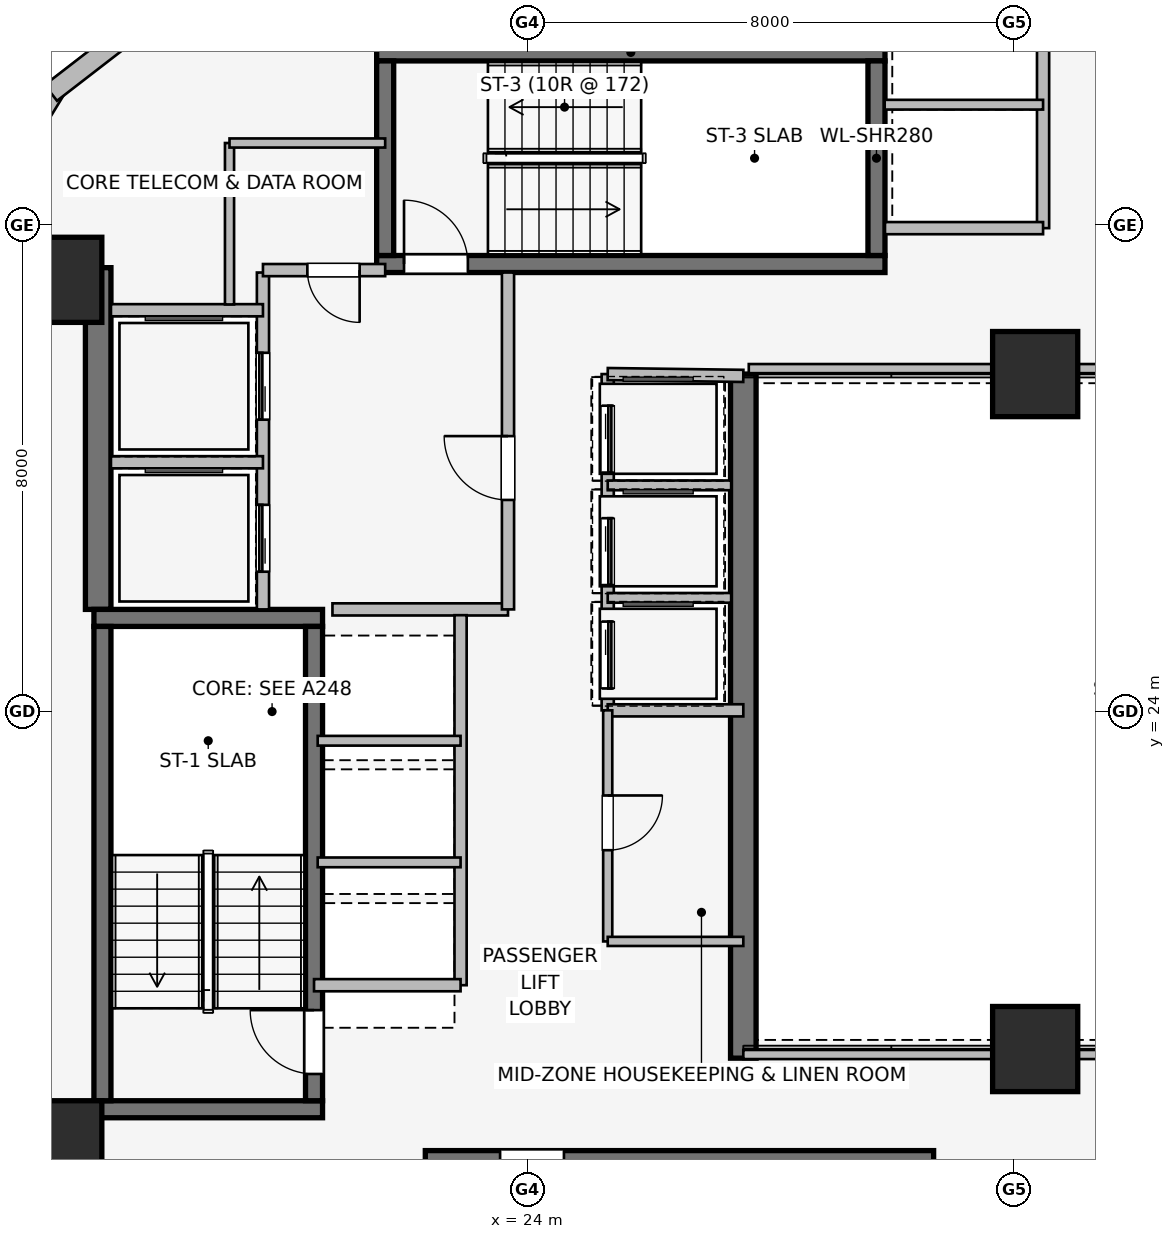
"""IFC4 building model, lengths in metres.
Left out: names, types, materials, properties, quantities, classifications, styles, units other than length and angle.
Written with IfcOpenShell. Run it as: python <this file> out.ifc"""

import sys

from ifc_helpers import new_model, si_unit, direction, frame, frame_2d, origin, origin_2d, place, context, subcontext, project, spatial, rectangle, extrude, element, fill, save


model = new_model("IFC4")
c1 = context("Model", 3, precision=1e-05, world=origin(), true_north=direction((0.0, 1.0)))
c2 = subcontext(c1, "Body", "Model", "MODEL_VIEW")
j1 = project(units=[si_unit("LENGTHUNIT", "METRE"), si_unit("PLANEANGLEUNIT", "RADIAN")], contexts=[c1])
p1 = place(None, origin())
s1 = spatial("IfcSite", under=j1, at=p1, CompositionType="ELEMENT")
p2 = place(p1, origin())
s2 = spatial("IfcBuilding", under=s1, at=p2, CompositionType="ELEMENT")
p3 = place(p2, frame((0.0, 0.0, 170.55)))
s3 = spatial("IfcBuildingStorey", under=s2, at=p3, CompositionType="ELEMENT", Elevation=170.55)
p4 = place(p3, frame((16.94, 25.68, 0.0), z_axis=(0.0, 0.0, 1.0), x_axis=(0.0, 1.0, 0.0)))
e1 = element("IfcWall", 1, at=p4, inside=s3, PredefinedType="SHEAR", context=c2, shape_type="SweptSolid", body=[
    extrude(rectangle(XDim=5.62, YDim=0.42, at=frame_2d((2.81, 0.0))), origin(), (0.0, 0.0, 1.0), 3.45),
])
p5 = place(p3, frame((27.55, 29.55, 0.0), z_axis=(0.0, 0.0, 1.0), x_axis=(0.0, -1.0, 0.0)))
e2 = element("IfcWall", 2, at=p5, inside=s3, PredefinedType="SHEAR", context=c2, shape_type="SweptSolid", body=[
    extrude(rectangle(XDim=11.25, YDim=0.42, at=frame_2d((5.625, 0.0))), origin(), (0.0, 0.0, 1.0), 3.45),
])
for number, where, z_axis, x_axis in (
    (3, (16.87, 17.46, 0.0), (0.0, 0.0, 1.0), (1.0, 0.0, 0.0)),
    (4, (20.63, 25.54, 0.0), (0.0, 0.0, 1.0), (-1.0, 0.0, 0.0)),
):
    element("IfcWall", number, at=place(p3, frame(where, z_axis=z_axis, x_axis=x_axis)), inside=s3, PredefinedType="SHEAR", context=c2, shape_type="SweptSolid", body=[
        extrude(rectangle(XDim=3.76, YDim=0.28, at=frame_2d((1.88, 0.0))), origin(), (0.0, 0.0, 1.0), 3.45),
    ])
p6 = place(p3, frame((17.01, 25.4, 0.0), z_axis=(0.0, 0.0, 1.0), x_axis=(0.0, -1.0, 0.0)))
e5 = element("IfcWall", 5, at=p6, inside=s3, PredefinedType="SHEAR", context=c2, shape_type="SweptSolid", body=[
    extrude(rectangle(XDim=7.8, YDim=0.28, at=frame_2d((3.9, 0.0))), origin(), (0.0, 0.0, 1.0), 3.45),
])
p7 = place(p3, frame((20.49, 17.6, 0.0), z_axis=(0.0, 0.0, 1.0), x_axis=(0.0, 1.0, 0.0)))
e6 = element("IfcWall", 6, at=p7, inside=s3, PredefinedType="SHEAR", context=c2, shape_type="SweptSolid", body=[
    extrude(rectangle(XDim=7.8, YDim=0.28, at=frame_2d((3.9, 0.0))), origin(), (0.0, 0.0, 1.0), 3.45),
])
p8 = place(p7, frame((0.44, 0.0, 0.0)))
e7 = element("IfcOpeningElement", 7, at=p8, cuts=e6, PredefinedType="OPENING", context=c2, shape_type="SweptSolid", body=[
    extrude(rectangle(XDim=1.05, YDim=2.0, at=frame_2d((0.525, 1.0))), frame((0.0, 0.15, 0.0), z_axis=(0.0, -1.0, 0.0), x_axis=(1.0, 0.0, 0.0)), (0.0, 0.0, 1.0), 0.3),
])
p9 = place(p3, frame((30.68, 16.64, 0.0), z_axis=(0.0, 0.0, 1.0), x_axis=(-1.0, 0.0, 0.0)))
e8 = element("IfcWall", 8, at=p9, inside=s3, PredefinedType="SHEAR", context=c2, shape_type="SweptSolid", body=[
    extrude(rectangle(XDim=8.36, YDim=0.28, at=frame_2d((4.18, 0.0))), origin(), (0.0, 0.0, 1.0), 3.45),
])
p10 = place(p9, frame((6.08, 0.0, 0.0)))
e9 = element("IfcOpeningElement", 9, at=p10, cuts=e8, PredefinedType="OPENING", context=c2, shape_type="SweptSolid", body=[
    extrude(rectangle(XDim=1.05, YDim=2.0, at=frame_2d((0.525, 1.0))), frame((0.0, 0.15, 0.0), z_axis=(0.0, -1.0, 0.0), x_axis=(1.0, 0.0, 0.0)), (0.0, 0.0, 1.0), 0.3),
])
p11 = place(p3, frame((21.52, 31.36, 0.0), z_axis=(0.0, 0.0, 1.0), x_axis=(1.0, 0.0, 0.0)))
e10 = element("IfcWall", 10, at=p11, inside=s3, PredefinedType="SHEAR", context=c2, shape_type="SweptSolid", body=[
    extrude(rectangle(XDim=8.36, YDim=0.28, at=frame_2d((4.18, 0.0))), origin(), (0.0, 0.0, 1.0), 3.45),
])
p12 = place(p11, frame((0.45, 0.0, 0.0)))
e11 = element("IfcOpeningElement", 11, at=p12, cuts=e10, PredefinedType="OPENING", context=c2, shape_type="SweptSolid", body=[
    extrude(rectangle(XDim=1.05, YDim=2.0, at=frame_2d((0.525, 1.0))), frame((0.0, 0.15, 0.0), z_axis=(0.0, -1.0, 0.0), x_axis=(1.0, 0.0, 0.0)), (0.0, 0.0, 1.0), 0.3),
])
p13 = place(p3, frame((29.88, 34.84, 0.0), z_axis=(0.0, 0.0, 1.0), x_axis=(-1.0, 0.0, 0.0)))
e12 = element("IfcWall", 12, at=p13, inside=s3, PredefinedType="SHEAR", context=c2, shape_type="SweptSolid", body=[
    extrude(rectangle(XDim=8.36, YDim=0.28, at=frame_2d((4.18, 0.0))), origin(), (0.0, 0.0, 1.0), 3.45),
])
for number, where, z_axis, x_axis in (
    (13, (21.66, 34.7, 0.0), (0.0, 0.0, 1.0), (0.0, -1.0, 0.0)),
    (14, (29.74, 31.5, 0.0), (0.0, 0.0, 1.0), (0.0, 1.0, 0.0)),
):
    element("IfcWall", number, at=place(p3, frame(where, z_axis=z_axis, x_axis=x_axis)), inside=s3, PredefinedType="SHEAR", context=c2, shape_type="SweptSolid", body=[
        extrude(rectangle(XDim=3.2, YDim=0.28, at=frame_2d((1.6, 0.0))), origin(), (0.0, 0.0, 1.0), 3.45),
    ])
for number, where, z_axis, x_axis in (
    (15, (16.3, 16.9, 0.0), (0.0, 0.0, 1.0), (1.0, 0.0, 0.0)),
    (16, (16.3, 31.1, 0.0), (0.0, 0.0, 1.0), (1.0, 0.0, 0.0)),
    (17, (32.35, 18.45, 0.0), (0.0, 0.0, 1.0), (1.0, 0.0, 0.0)),
    (18, (32.35, 29.55, 0.0), (0.0, 0.0, 1.0), (1.0, 0.0, 0.0)),
):
    element("IfcColumn", number, at=place(p3, frame(where, z_axis=z_axis, x_axis=x_axis)), inside=s3, PredefinedType="COLUMN", context=c2, shape_type="SweptSolid", body=[
        extrude(rectangle(XDim=1.4, YDim=1.4, at=origin_2d()), origin(), (0.0, 0.0, 1.0), 3.45),
    ])
p14 = place(p3, frame((15.415, 32.882, 0.0), z_axis=(0.0, 0.0, 1.0), x_axis=(0.520325409202, 0.853968072318, 0.0)))
e19 = element("IfcWall", 19, at=p14, inside=s3, PredefinedType="STANDARD", context=c2, shape_type="SweptSolid", body=[
    extrude(rectangle(XDim=1.678, YDim=0.33, at=frame_2d((0.839, 0.0))), origin(), (0.0, 0.0, 1.0), 3.16),
])
p15 = place(p3, frame((16.162, 34.175, 0.0), z_axis=(0.0, 0.0, 1.0), x_axis=(0.791409877269, 0.611285862884, 0.0)))
e20 = element("IfcWall", 20, at=p15, inside=s3, PredefinedType="STANDARD", context=c2, shape_type="SweptSolid", body=[
    extrude(rectangle(XDim=1.677, YDim=0.33, at=frame_2d((0.838, 0.0))), origin(), (0.0, 0.0, 1.0), 3.16),
])
p16 = place(p3, frame((19.65, 25.68, 0.0), z_axis=(0.0, 0.0, 1.0), x_axis=(0.0, 1.0, 0.0)))
e21 = element("IfcWall", 21, at=p16, inside=s3, PredefinedType="PARTITIONING", context=c2, shape_type="SweptSolid", body=[
    extrude(rectangle(XDim=5.54, YDim=0.2, at=frame_2d((2.77, 0.0))), origin(), (0.0, 0.0, 1.0), 3.16),
])
p17 = place(p16, frame((0.62, 0.0, 0.0)))
e22 = element("IfcOpeningElement", 22, at=p17, cuts=e21, PredefinedType="OPENING", context=c2, shape_type="SweptSolid", body=[
    extrude(rectangle(XDim=1.1, YDim=2.2, at=frame_2d((0.55, 1.1))), frame((0.0, 0.11, 0.0), z_axis=(0.0, -1.0, 0.0), x_axis=(1.0, 0.0, 0.0)), (0.0, 0.0, 1.0), 0.22),
])
p18 = place(p16, frame((3.12, 0.0, 0.0)))
e23 = element("IfcOpeningElement", 23, at=p18, cuts=e21, PredefinedType="OPENING", context=c2, shape_type="SweptSolid", body=[
    extrude(rectangle(XDim=1.1, YDim=2.2, at=frame_2d((0.55, 1.1))), frame((0.0, 0.11, 0.0), z_axis=(0.0, -1.0, 0.0), x_axis=(1.0, 0.0, 0.0)), (0.0, 0.0, 1.0), 0.22),
])
p19 = place(p3, frame((20.793, 25.68, 0.0), z_axis=(0.0, 0.0, 1.0), x_axis=(1.0, 0.0, 0.0)))
e24 = element("IfcWall", 24, at=p19, inside=s3, PredefinedType="PARTITIONING", context=c2, shape_type="SweptSolid", body=[
    extrude(rectangle(XDim=2.887, YDim=0.2, at=frame_2d((1.443, 0.0))), origin(), (0.0, 0.0, 1.0), 3.16),
])
p20 = place(p3, frame((23.68, 25.68, 0.0), z_axis=(0.0, 0.0, 1.0), x_axis=(0.0, 1.0, 0.0)))
e25 = element("IfcWall", 25, at=p20, inside=s3, PredefinedType="PARTITIONING", context=c2, shape_type="SweptSolid", body=[
    extrude(rectangle(XDim=5.54, YDim=0.2, at=frame_2d((2.77, 0.0))), origin(), (0.0, 0.0, 1.0), 3.16),
])
p21 = place(p20, frame((1.8, 0.0, 0.0)))
e26 = element("IfcOpeningElement", 26, at=p21, cuts=e25, PredefinedType="OPENING", context=c2, shape_type="SweptSolid", body=[
    extrude(rectangle(XDim=1.05, YDim=2.0, at=frame_2d((0.525, 1.0))), frame((0.0, 0.11, 0.0), z_axis=(0.0, -1.0, 0.0), x_axis=(1.0, 0.0, 0.0)), (0.0, 0.0, 1.0), 0.22),
])
p22 = place(p3, frame((21.66, 31.26, 0.0), z_axis=(0.0, 0.0, 1.0), x_axis=(-1.0, 0.0, 0.0)))
e27 = element("IfcWall", 27, at=p22, inside=s3, PredefinedType="PARTITIONING", context=c2, shape_type="SweptSolid", body=[
    extrude(rectangle(XDim=2.01, YDim=0.2, at=frame_2d((1.005, 0.0))), origin(), (0.0, 0.0, 1.0), 3.16),
])
p23 = place(p22, frame((0.42, 0.0, 0.0)))
e28 = element("IfcOpeningElement", 28, at=p23, cuts=e27, PredefinedType="OPENING", context=c2, shape_type="SweptSolid", body=[
    extrude(rectangle(XDim=0.86, YDim=2.0, at=frame_2d((0.43, 1.0))), frame((0.0, 0.11, 0.0), z_axis=(0.0, -1.0, 0.0), x_axis=(1.0, 0.0, 0.0)), (0.0, 0.0, 1.0), 0.22),
])
p24 = place(p3, frame((17.15, 28.1, 0.0), z_axis=(0.0, 0.0, 1.0), x_axis=(1.0, 0.0, 0.0)))
e29 = element("IfcWall", 29, at=p24, inside=s3, PredefinedType="PARTITIONING", context=c2, shape_type="SweptSolid", body=[
    extrude(rectangle(XDim=2.5, YDim=0.2, at=frame_2d((1.25, 0.0))), origin(), (0.0, 0.0, 1.0), 3.16),
])
p25 = place(p3, frame((19.65, 30.6, 0.0), z_axis=(0.0, 0.0, 1.0), x_axis=(-1.0, 0.0, 0.0)))
e30 = element("IfcWall", 30, at=p25, inside=s3, PredefinedType="PARTITIONING", context=c2, shape_type="SweptSolid", body=[
    extrude(rectangle(XDim=2.5, YDim=0.2, at=frame_2d((1.25, 0.0))), origin(), (0.0, 0.0, 1.0), 2.06),
])
p26 = place(p3, frame((32.48, 31.95, 0.0), z_axis=(0.0, 0.0, 1.0), x_axis=(0.0, 1.0, 0.0)))
e31 = element("IfcWall", 31, at=p26, inside=s3, PredefinedType="PARTITIONING", context=c2, shape_type="SweptSolid", body=[
    extrude(rectangle(XDim=4.05, YDim=0.2, at=frame_2d((2.025, 0.0))), origin(), (0.0, 0.0, 1.0), 3.16),
])
p27 = place(p3, frame((32.48, 31.95, 0.0), z_axis=(0.0, 0.0, 1.0), x_axis=(-1.0, 0.0, 0.0)))
e32 = element("IfcWall", 32, at=p27, inside=s3, PredefinedType="PARTITIONING", context=c2, shape_type="SweptSolid", body=[
    extrude(rectangle(XDim=2.6, YDim=0.2, at=frame_2d((1.3, 0.0))), origin(), (0.0, 0.0, 1.0), 3.16),
])
p28 = place(p3, frame((29.875, 33.98, 0.0), z_axis=(0.0, 0.0, 1.0), x_axis=(1.0, 0.0, 0.0)))
e33 = element("IfcWall", 33, at=p28, inside=s3, PredefinedType="PARTITIONING", context=c2, shape_type="SweptSolid", body=[
    extrude(rectangle(XDim=2.605, YDim=0.16, at=frame_2d((1.302, 0.0))), origin(), (0.0, 0.0, 1.0), 2.552),
])
p29 = place(p3, frame((22.9, 19.5, 0.0), z_axis=(0.0, 0.0, 1.0), x_axis=(0.0, 1.0, 0.0)))
e34 = element("IfcWall", 34, at=p29, inside=s3, PredefinedType="PARTITIONING", context=c2, shape_type="SweptSolid", body=[
    extrude(rectangle(XDim=6.085, YDim=0.2, at=frame_2d((3.042, 0.0))), origin(), (0.0, 0.0, 1.0), 3.16),
])
p30 = place(p3, frame((20.49, 19.5, 0.0), z_axis=(0.0, 0.0, 1.0), x_axis=(1.0, 0.0, 0.0)))
e35 = element("IfcWall", 35, at=p30, inside=s3, PredefinedType="PARTITIONING", context=c2, shape_type="SweptSolid", body=[
    extrude(rectangle(XDim=2.41, YDim=0.2, at=frame_2d((1.205, 0.0))), origin(), (0.0, 0.0, 1.0), 2.06),
])
for number, where, z_axis, x_axis in (
    (36, (20.55, 21.52, 0.0), (0.0, 0.0, 1.0), (1.0, 0.0, 0.0)),
    (37, (20.55, 23.52, 0.0), (0.0, 0.0, 1.0), (1.0, 0.0, 0.0)),
):
    element("IfcWall", number, at=place(p3, frame(where, z_axis=z_axis, x_axis=x_axis)), inside=s3, PredefinedType="PARTITIONING", context=c2, shape_type="SweptSolid", body=[
        extrude(rectangle(XDim=2.35, YDim=0.16, at=frame_2d((1.175, 0.0))), origin(), (0.0, 0.0, 1.0), 3.16),
    ])
p31 = place(p3, frame((25.32, 29.55, 0.0), z_axis=(0.0, 0.0, 1.0), x_axis=(0.0, -1.0, 0.0)))
e38 = element("IfcWall", 38, at=p31, inside=s3, PredefinedType="PARTITIONING", context=c2, shape_type="SweptSolid", body=[
    extrude(rectangle(XDim=5.53, YDim=0.2, at=frame_2d((2.765, 0.0))), origin(), (0.0, 0.0, 1.0), 3.16),
])
p32 = place(p31, frame((0.52, 0.0, 0.0)))
e39 = element("IfcOpeningElement", 39, at=p32, cuts=e38, PredefinedType="OPENING", context=c2, shape_type="SweptSolid", body=[
    extrude(rectangle(XDim=1.1, YDim=2.2, at=frame_2d((0.55, 1.1))), frame((0.0, 0.11, 0.0), z_axis=(0.0, -1.0, 0.0), x_axis=(1.0, 0.0, 0.0)), (0.0, 0.0, 1.0), 0.22),
])
p33 = place(p31, frame((2.37, 0.0, 0.0)))
e40 = element("IfcOpeningElement", 40, at=p33, cuts=e38, PredefinedType="OPENING", context=c2, shape_type="SweptSolid", body=[
    extrude(rectangle(XDim=1.1, YDim=2.2, at=frame_2d((0.55, 1.1))), frame((0.0, 0.11, 0.0), z_axis=(0.0, -1.0, 0.0), x_axis=(1.0, 0.0, 0.0)), (0.0, 0.0, 1.0), 0.22),
])
p34 = place(p31, frame((4.07, 0.0, 0.0)))
e41 = element("IfcOpeningElement", 41, at=p34, cuts=e38, PredefinedType="OPENING", context=c2, shape_type="SweptSolid", body=[
    extrude(rectangle(XDim=1.1, YDim=2.2, at=frame_2d((0.55, 1.1))), frame((0.0, 0.11, 0.0), z_axis=(0.0, -1.0, 0.0), x_axis=(1.0, 0.0, 0.0)), (0.0, 0.0, 1.0), 0.22),
])
p35 = place(p3, frame((27.55, 29.52, 0.0), z_axis=(0.0, 0.0, 1.0), x_axis=(-0.999909343457, 0.013464949556, 0.0)))
e42 = element("IfcWall", 42, at=p35, inside=s3, PredefinedType="PARTITIONING", context=c2, shape_type="SweptSolid", body=[
    extrude(rectangle(XDim=2.23, YDim=0.2, at=frame_2d((1.115, 0.0))), origin(), (0.0, 0.0, 1.0), 2.06),
])
p36 = place(p3, frame((25.32, 24.02, 0.0), z_axis=(0.0, 0.0, 1.0), x_axis=(1.0, 0.0, 0.0)))
e43 = element("IfcWall", 43, at=p36, inside=s3, PredefinedType="PARTITIONING", context=c2, shape_type="SweptSolid", body=[
    extrude(rectangle(XDim=2.23, YDim=0.2, at=frame_2d((1.115, 0.0))), origin(), (0.0, 0.0, 1.0), 3.16),
])
for number, where, z_axis, x_axis in (
    (44, (25.32, 25.87, 0.0), (0.0, 0.0, 1.0), (1.0, 0.0, 0.0)),
    (45, (25.32, 27.72, 0.0), (0.0, 0.0, 1.0), (1.0, 0.0, 0.0)),
):
    element("IfcWall", number, at=place(p3, frame(where, z_axis=z_axis, x_axis=x_axis)), inside=s3, PredefinedType="PARTITIONING", context=c2, shape_type="SweptSolid", body=[
        extrude(rectangle(XDim=2.03, YDim=0.16, at=frame_2d((1.015, 0.0))), origin(), (0.0, 0.0, 1.0), 3.16),
    ])
p37 = place(p3, frame((25.32, 24.02, 0.0), z_axis=(0.0, 0.0, 1.0), x_axis=(0.0, -1.0, 0.0)))
e46 = element("IfcWall", 46, at=p37, inside=s3, PredefinedType="PARTITIONING", context=c2, shape_type="SweptSolid", body=[
    extrude(rectangle(XDim=3.8, YDim=0.15, at=frame_2d((1.9, 0.0))), origin(), (0.0, 0.0, 1.0), 3.16),
])
p38 = place(p37, frame((1.4, 0.0, 0.0)))
e47 = element("IfcOpeningElement", 47, at=p38, cuts=e46, PredefinedType="OPENING", context=c2, shape_type="SweptSolid", body=[
    extrude(rectangle(XDim=0.9, YDim=2.0, at=frame_2d((0.45, 1.0))), frame((0.0, 0.085, 0.0), z_axis=(0.0, -1.0, 0.0), x_axis=(1.0, 0.0, 0.0)), (0.0, 0.0, 1.0), 0.17),
])
p39 = place(p3, frame((25.32, 20.22, 0.0), z_axis=(0.0, 0.0, 1.0), x_axis=(1.0, 0.0, 0.0)))
e48 = element("IfcWall", 48, at=p39, inside=s3, PredefinedType="PARTITIONING", context=c2, shape_type="SweptSolid", body=[
    extrude(rectangle(XDim=2.23, YDim=0.15, at=frame_2d((1.115, 0.0))), origin(), (0.0, 0.0, 1.0), 3.16),
])
p40 = place(p3, frame((19.1, 33.35, 0.0), z_axis=(0.0, 0.0, 1.0), x_axis=(0.0, -1.0, 0.0)))
e49 = element("IfcWall", 49, at=p40, inside=s3, PredefinedType="PARTITIONING", context=c2, shape_type="SweptSolid", body=[
    extrude(rectangle(XDim=2.655, YDim=0.15, at=frame_2d((1.328, 0.0))), origin(), (0.0, 0.0, 1.0), 3.16),
])
p41 = place(p3, frame((21.66, 33.35, 0.0), z_axis=(0.0, 0.0, 1.0), x_axis=(-1.0, 0.0, 0.0)))
e50 = element("IfcWall", 50, at=p41, inside=s3, PredefinedType="PARTITIONING", context=c2, shape_type="SweptSolid", body=[
    extrude(rectangle(XDim=2.56, YDim=0.15, at=frame_2d((1.28, 0.0))), origin(), (0.0, 0.0, 1.0), 3.16),
])
p42 = place(p3, frame((27.55, 18.36, 0.0), z_axis=(0.0, 0.0, 1.0), x_axis=(1.0, 0.0, 0.0)))
e51 = element("IfcWall", 51, at=p42, inside=s3, PredefinedType="PARTITIONING", context=c2, shape_type="SweptSolid", body=[
    extrude(rectangle(XDim=12.29, YDim=0.15, at=frame_2d((6.145, 0.0))), origin(), (0.0, 0.0, 1.0), 2.301),
])
p43 = place(p3, frame((39.84, 29.64, 0.0), z_axis=(0.0, 0.0, 1.0), x_axis=(-1.0, 0.0, 0.0)))
e52 = element("IfcWall", 52, at=p43, inside=s3, PredefinedType="PARTITIONING", context=c2, shape_type="SweptSolid", body=[
    extrude(rectangle(XDim=12.2, YDim=0.15, at=frame_2d((6.1, 0.0))), origin(), (0.0, 0.0, 1.0), 2.301),
])
p44 = place(p8, origin())
e53 = element("IfcDoor", 53, at=p44, inside=s3, OperationType="SINGLE_SWING_RIGHT", PredefinedType="DOOR", context=c2, shape_type="SweptSolid", body=[
    extrude(rectangle(XDim=1.05, YDim=2.0, at=frame_2d((0.525, 1.0))), frame((0.0, 0.025, 0.0), z_axis=(0.0, -1.0, 0.0), x_axis=(1.0, 0.0, 0.0)), (0.0, 0.0, 1.0), 0.05),
])
fill(e7, e53)
p45 = place(p10, origin())
e54 = element("IfcDoor", 54, at=p45, inside=s3, OperationType="SINGLE_SWING_RIGHT", PredefinedType="DOOR", context=c2, shape_type="SweptSolid", body=[
    extrude(rectangle(XDim=1.05, YDim=2.0, at=frame_2d((0.525, 1.0))), frame((0.0, 0.025, 0.0), z_axis=(0.0, -1.0, 0.0), x_axis=(1.0, 0.0, 0.0)), (0.0, 0.0, 1.0), 0.05),
])
fill(e9, e54)
p46 = place(p12, origin())
e55 = element("IfcDoor", 55, at=p46, inside=s3, OperationType="SINGLE_SWING_LEFT", PredefinedType="DOOR", context=c2, shape_type="SweptSolid", body=[
    extrude(rectangle(XDim=1.05, YDim=2.0, at=frame_2d((0.525, 1.0))), frame((0.0, 0.025, 0.0), z_axis=(0.0, -1.0, 0.0), x_axis=(1.0, 0.0, 0.0)), (0.0, 0.0, 1.0), 0.05),
])
fill(e11, e55)
p47 = place(p17, origin())
e56 = element("IfcDoor", 56, at=p47, inside=s3, OperationType="SLIDING_TO_LEFT", PredefinedType="DOOR", context=c2, shape_type="SweptSolid", body=[
    extrude(rectangle(XDim=1.1, YDim=2.2, at=frame_2d((0.55, 1.1))), frame((0.0, 0.025, 0.0), z_axis=(0.0, -1.0, 0.0), x_axis=(1.0, 0.0, 0.0)), (0.0, 0.0, 1.0), 0.05),
])
fill(e22, e56)
p48 = place(p18, origin())
e57 = element("IfcDoor", 57, at=p48, inside=s3, OperationType="SLIDING_TO_LEFT", PredefinedType="DOOR", context=c2, shape_type="SweptSolid", body=[
    extrude(rectangle(XDim=1.1, YDim=2.2, at=frame_2d((0.55, 1.1))), frame((0.0, 0.025, 0.0), z_axis=(0.0, -1.0, 0.0), x_axis=(1.0, 0.0, 0.0)), (0.0, 0.0, 1.0), 0.05),
])
fill(e23, e57)
p49 = place(p21, origin())
e58 = element("IfcDoor", 58, at=p49, inside=s3, OperationType="SINGLE_SWING_RIGHT", PredefinedType="DOOR", context=c2, shape_type="SweptSolid", body=[
    extrude(rectangle(XDim=1.05, YDim=2.0, at=frame_2d((0.525, 1.0))), frame((0.0, 0.025, 0.0), z_axis=(0.0, -1.0, 0.0), x_axis=(1.0, 0.0, 0.0)), (0.0, 0.0, 1.0), 0.05),
])
fill(e26, e58)
p50 = place(p23, origin())
e59 = element("IfcDoor", 59, at=p50, inside=s3, OperationType="SINGLE_SWING_LEFT", PredefinedType="DOOR", context=c2, shape_type="SweptSolid", body=[
    extrude(rectangle(XDim=0.86, YDim=2.0, at=frame_2d((0.43, 1.0))), frame((0.0, 0.025, 0.0), z_axis=(0.0, -1.0, 0.0), x_axis=(1.0, 0.0, 0.0)), (0.0, 0.0, 1.0), 0.05),
])
fill(e28, e59)
p51 = place(p32, origin())
e60 = element("IfcDoor", 60, at=p51, inside=s3, OperationType="SLIDING_TO_LEFT", PredefinedType="DOOR", context=c2, shape_type="SweptSolid", body=[
    extrude(rectangle(XDim=1.1, YDim=2.2, at=frame_2d((0.55, 1.1))), frame((0.0, 0.025, 0.0), z_axis=(0.0, -1.0, 0.0), x_axis=(1.0, 0.0, 0.0)), (0.0, 0.0, 1.0), 0.05),
])
fill(e39, e60)
p52 = place(p33, origin())
e61 = element("IfcDoor", 61, at=p52, inside=s3, OperationType="SLIDING_TO_LEFT", PredefinedType="DOOR", context=c2, shape_type="SweptSolid", body=[
    extrude(rectangle(XDim=1.1, YDim=2.2, at=frame_2d((0.55, 1.1))), frame((0.0, 0.025, 0.0), z_axis=(0.0, -1.0, 0.0), x_axis=(1.0, 0.0, 0.0)), (0.0, 0.0, 1.0), 0.05),
])
fill(e40, e61)
p53 = place(p34, origin())
e62 = element("IfcDoor", 62, at=p53, inside=s3, OperationType="SLIDING_TO_LEFT", PredefinedType="DOOR", context=c2, shape_type="SweptSolid", body=[
    extrude(rectangle(XDim=1.1, YDim=2.2, at=frame_2d((0.55, 1.1))), frame((0.0, 0.025, 0.0), z_axis=(0.0, -1.0, 0.0), x_axis=(1.0, 0.0, 0.0)), (0.0, 0.0, 1.0), 0.05),
])
fill(e41, e62)
p54 = place(p38, origin())
e63 = element("IfcDoor", 63, at=p54, inside=s3, OperationType="SINGLE_SWING_LEFT", PredefinedType="DOOR", context=c2, shape_type="SweptSolid", body=[
    extrude(rectangle(XDim=0.9, YDim=2.0, at=frame_2d((0.45, 1.0))), frame((0.0, 0.025, 0.0), z_axis=(0.0, -1.0, 0.0), x_axis=(1.0, 0.0, 0.0)), (0.0, 0.0, 1.0), 0.05),
])
fill(e47, e63)
save(model, sys.argv[1])
